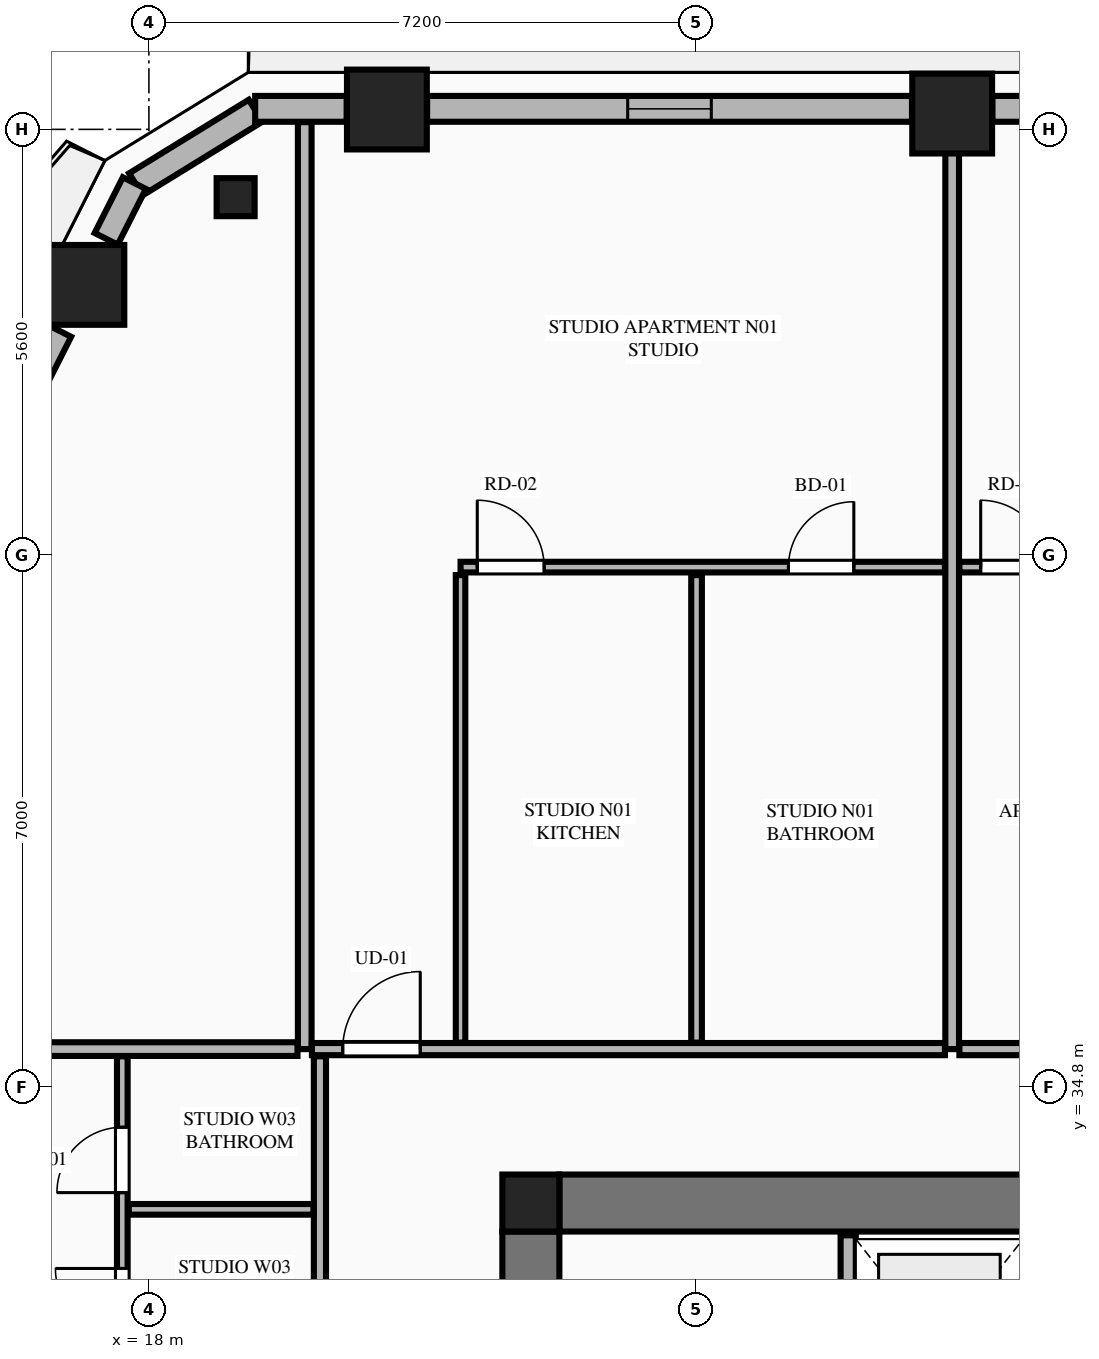
"""IFC4 building model, lengths in metres.
Left out: names, types, materials, properties, quantities, classifications, styles, units other than length and angle.
Written with IfcOpenShell. Run it as: python <this file> out.ifc"""

import sys

from ifc_helpers import new_model, si_unit, direction, frame, frame_2d, origin, origin_2d, place, context, subcontext, project, spatial, rectangle, extrude, element, fill, save


model = new_model("IFC4")
c1 = context("Model", 3, precision=1e-05, world=origin(), true_north=direction((0.0, 1.0)))
c2 = subcontext(c1, "Body", "Model", "MODEL_VIEW")
j1 = project(units=[si_unit("LENGTHUNIT", "METRE"), si_unit("PLANEANGLEUNIT", "RADIAN")], contexts=[c1])
p1 = place(None, origin())
s1 = spatial("IfcSite", under=j1, at=p1, CompositionType="ELEMENT")
p2 = place(p1, origin())
s2 = spatial("IfcBuilding", under=s1, at=p2, CompositionType="ELEMENT")
p3 = place(p2, frame((0.0, 0.0, 137.45)))
s3 = spatial("IfcBuildingStorey", under=s2, at=p3, CompositionType="ELEMENT", Elevation=137.45)
p4 = place(p3, frame((23.025, 33.275, 0.0), z_axis=(0.0, 0.0, 1.0), x_axis=(1.0, 0.0, 0.0)))
e1 = element("IfcColumn", 1, at=p4, inside=s3, PredefinedType="COLUMN", context=c2, shape_type="SweptSolid", body=[
    extrude(rectangle(XDim=0.75, YDim=0.75, at=origin_2d()), origin(), (0.0, 0.0, 1.0), 3.55),
])
p5 = place(p3, frame((23.4, 33.275, 0.0), z_axis=(0.0, 0.0, 1.0), x_axis=(1.0, 0.0, 0.0)))
e2 = element("IfcWall", 2, at=p5, inside=s3, PredefinedType="SHEAR", context=c2, shape_type="SweptSolid", body=[
    extrude(rectangle(XDim=18.0, YDim=0.75, at=frame_2d((9.0, 0.0))), origin(), (0.0, 0.0, 1.0), 3.34),
])
p6 = place(p3, frame((23.025, 18.9, 0.0), z_axis=(0.0, 0.0, 1.0), x_axis=(0.0, 1.0, 0.0)))
e3 = element("IfcWall", 3, at=p6, inside=s3, PredefinedType="SHEAR", context=c2, shape_type="SweptSolid", body=[
    extrude(rectangle(XDim=14.0, YDim=0.75, at=frame_2d((7.0, 0.0))), origin(), (0.0, 0.0, 1.0), 3.34),
])
p7 = place(p6, frame((2.94, 0.0, 0.0)))
e4 = element("IfcOpeningElement", 4, at=p7, cuts=e3, PredefinedType="OPENING", context=c2, shape_type="SweptSolid", body=[
    extrude(rectangle(XDim=1.22, YDim=2.25, at=frame_2d((0.61, 1.125))), frame((0.0, 0.385, 0.0), z_axis=(0.0, -1.0, 0.0), x_axis=(1.0, 0.0, 0.0)), (0.0, 0.0, 1.0), 0.77),
])
for number, where, z_axis, x_axis in (
    (5, (28.568, 47.608, 0.0), (0.0, 0.0, 1.0), (1.0, 0.0, 0.0)),
    (6, (21.131, 47.661, 0.0), (0.0, 0.0, 1.0), (1.0, 0.0, 0.0)),
    (7, (17.151, 45.354, 0.0), (0.0, 0.0, 1.0), (1.0, 0.0, 0.0)),
):
    element("IfcColumn", number, at=place(p3, frame(where, z_axis=z_axis, x_axis=x_axis)), inside=s3, PredefinedType="COLUMN", context=c2, shape_type="SweptSolid", body=[
        extrude(rectangle(XDim=1.05, YDim=1.05, at=origin_2d()), origin(), (0.0, 0.0, 1.0), 3.55),
    ])
p8 = place(p3, frame((19.141, 46.508, 0.0), z_axis=(0.0, 0.0, 1.0), x_axis=(-0.865160173452, -0.501495637342, 0.0)))
e8 = element("IfcColumn", 8, at=p8, inside=s3, PredefinedType="PILASTER", context=c2, shape_type="SweptSolid", body=[
    extrude(rectangle(XDim=0.5, YDim=0.35, at=origin_2d()), origin(), (0.0, 0.0, 1.0), 3.55),
])
p9 = place(p3, frame((27.2, 30.0, 0.0), z_axis=(0.0, 0.0, 1.0), x_axis=(0.0, 1.0, 0.0)))
e9 = element("IfcWall", 9, at=p9, inside=s3, PredefinedType="PLUMBINGWALL", context=c2, shape_type="SweptSolid", body=[
    extrude(rectangle(XDim=2.85, YDim=0.2, at=frame_2d((1.425, 0.0))), origin(), (0.0, 0.0, 1.0), 3.34),
])
p10 = place(p3, frame((19.403, 47.645, 0.0), z_axis=(0.0, 0.0, 1.0), x_axis=(-0.851798915137, -0.523868884523, 0.0)))
e10 = element("IfcWall", 10, at=p10, inside=s3, PredefinedType="STANDARD", context=c2, shape_type="SweptSolid", body=[
    extrude(rectangle(XDim=1.848, YDim=0.34, at=frame_2d((0.924, 0.0))), origin(), (0.0, 0.0, 1.0), 3.34),
])
p11 = place(p3, frame((35.703, 47.67, 0.0), z_axis=(0.0, 0.0, 1.0), x_axis=(-1.0, 0.0, 0.0)))
e11 = element("IfcWall", 11, at=p11, inside=s3, PredefinedType="STANDARD", context=c2, shape_type="SweptSolid", body=[
    extrude(rectangle(XDim=6.606, YDim=0.34, at=frame_2d((3.303, 0.0))), origin(), (0.0, 0.0, 1.0), 2.797),
])
p12 = place(p11, frame((3.254, 0.0, 0.0)))
e12 = element("IfcOpeningElement", 12, at=p12, cuts=e11, PredefinedType="OPENING", context=c2, shape_type="SweptSolid", body=[
    extrude(rectangle(XDim=1.1, YDim=2.25, at=frame_2d((0.55, 1.125))), frame((0.0, 0.18, 0.0), z_axis=(0.0, -1.0, 0.0), x_axis=(1.0, 0.0, 0.0)), (0.0, 0.0, 1.0), 0.36),
])
p13 = place(p3, frame((28.039, 47.67, 0.0), z_axis=(0.0, 0.0, 1.0), x_axis=(-1.0, 0.0, 0.0)))
e13 = element("IfcWall", 13, at=p13, inside=s3, PredefinedType="STANDARD", context=c2, shape_type="SweptSolid", body=[
    extrude(rectangle(XDim=6.379, YDim=0.34, at=frame_2d((3.189, 0.0))), origin(), (0.0, 0.0, 1.0), 2.797),
])
p14 = place(p13, frame((2.64, 0.0, 0.75)))
e14 = element("IfcOpeningElement", 14, at=p14, cuts=e13, PredefinedType="OPENING", context=c2, shape_type="SweptSolid", body=[
    extrude(rectangle(XDim=1.1, YDim=1.897, at=frame_2d((0.55, 0.948))), frame((0.0, 0.18, 0.0), z_axis=(0.0, -1.0, 0.0), x_axis=(1.0, 0.0, 0.0)), (0.0, 0.0, 1.0), 0.36),
])
p15 = place(p3, frame((20.602, 47.67, 0.0), z_axis=(0.0, 0.0, 1.0), x_axis=(-1.0, 0.0, 0.0)))
e15 = element("IfcWall", 15, at=p15, inside=s3, PredefinedType="STANDARD", context=c2, shape_type="SweptSolid", body=[
    extrude(rectangle(XDim=1.204, YDim=0.34, at=frame_2d((0.602, 0.0))), origin(), (0.0, 0.0, 1.0), 3.34),
])
p16 = place(p3, frame((17.809, 46.693, 0.0), z_axis=(0.0, 0.0, 1.0), x_axis=(-0.45160540153, -0.89221777684, 0.0)))
e16 = element("IfcWall", 16, at=p16, inside=s3, PredefinedType="STANDARD", context=c2, shape_type="SweptSolid", body=[
    extrude(rectangle(XDim=0.822, YDim=0.34, at=frame_2d((0.411, 0.0))), origin(), (0.0, 0.0, 1.0), 3.34),
])
p17 = place(p3, frame((16.825, 44.748, 0.0), z_axis=(0.0, 0.0, 1.0), x_axis=(-0.451548465867, -0.892246593142, 0.0)))
e17 = element("IfcWall", 17, at=p17, inside=s3, PredefinedType="STANDARD", context=c2, shape_type="SweptSolid", body=[
    extrude(rectangle(XDim=5.04, YDim=0.34, at=frame_2d((2.52, 0.0))), origin(), (0.0, 0.0, 1.0), 2.797),
])
p18 = place(p17, frame((1.97, 0.0, 0.75)))
e18 = element("IfcOpeningElement", 18, at=p18, cuts=e17, PredefinedType="OPENING", context=c2, shape_type="SweptSolid", body=[
    extrude(rectangle(XDim=1.1, YDim=1.897, at=frame_2d((0.55, 0.948))), frame((0.0, 0.18, 0.0), z_axis=(0.0, -1.0, 0.0), x_axis=(1.0, 0.0, 0.0)), (0.0, 0.0, 1.0), 0.36),
])
p19 = place(p3, frame((20.05, 35.3, 0.0), z_axis=(0.0, 0.0, 1.0), x_axis=(0.0, 1.0, 0.0)))
e19 = element("IfcWall", 19, at=p19, inside=s3, PredefinedType="PARTITIONING", context=c2, shape_type="SweptSolid", body=[
    extrude(rectangle(XDim=12.195, YDim=0.18, at=frame_2d((6.098, 0.0))), origin(), (0.0, 0.0, 1.0), 3.34),
])
p20 = place(p3, frame((28.568, 35.3, 0.0), z_axis=(0.0, 0.0, 1.0), x_axis=(0.0, 1.0, 0.0)))
e20 = element("IfcWall", 20, at=p20, inside=s3, PredefinedType="PARTITIONING", context=c2, shape_type="SweptSolid", body=[
    extrude(rectangle(XDim=12.195, YDim=0.18, at=frame_2d((6.098, 0.0))), origin(), (0.0, 0.0, 1.0), 2.722),
])
p21 = place(p3, frame((20.145, 35.3, 0.0), z_axis=(0.0, 0.0, 1.0), x_axis=(1.0, 0.0, 0.0)))
e21 = element("IfcWall", 21, at=p21, inside=s3, PredefinedType="PARTITIONING", context=c2, shape_type="SweptSolid", body=[
    extrude(rectangle(XDim=8.328, YDim=0.16, at=frame_2d((4.164, 0.0))), origin(), (0.0, 0.0, 1.0), 3.34),
])
p22 = place(p21, frame((0.405, 0.0, 0.0)))
e22 = element("IfcOpeningElement", 22, at=p22, cuts=e21, PredefinedType="OPENING", context=c2, shape_type="SweptSolid", body=[
    extrude(rectangle(XDim=1.02, YDim=2.25, at=frame_2d((0.51, 1.125))), frame((0.0, 0.09, 0.0), z_axis=(0.0, -1.0, 0.0), x_axis=(1.0, 0.0, 0.0)), (0.0, 0.0, 1.0), 0.18),
])
p23 = place(p3, frame((22.1, 35.385, 0.0), z_axis=(0.0, 0.0, 1.0), x_axis=(0.0, 1.0, 0.0)))
e23 = element("IfcWall", 23, at=p23, inside=s3, PredefinedType="PARTITIONING", context=c2, shape_type="SweptSolid", body=[
    extrude(rectangle(XDim=6.151, YDim=0.125, at=frame_2d((3.075, 0.0))), origin(), (0.0, 0.0, 1.0), 2.722),
])
p24 = place(p3, frame((22.1, 41.641, 0.0), z_axis=(0.0, 0.0, 1.0), x_axis=(1.0, 0.0, 0.0)))
e24 = element("IfcWall", 24, at=p24, inside=s3, PredefinedType="PLUMBINGWALL", context=c2, shape_type="SweptSolid", body=[
    extrude(rectangle(XDim=6.373, YDim=0.14, at=frame_2d((3.187, 0.0))), origin(), (0.0, 0.0, 1.0), 3.34),
])
p25 = place(p24, frame((4.314, 0.0, 0.0)))
e25 = element("IfcOpeningElement", 25, at=p25, cuts=e24, PredefinedType="OPENING", context=c2, shape_type="SweptSolid", body=[
    extrude(rectangle(XDim=0.86, YDim=2.1, at=frame_2d((0.43, 1.05))), frame((0.0, 0.08, 0.0), z_axis=(0.0, -1.0, 0.0), x_axis=(1.0, 0.0, 0.0)), (0.0, 0.0, 1.0), 0.16),
])
p26 = place(p24, frame((0.22, 0.0, 0.0)))
e26 = element("IfcOpeningElement", 26, at=p26, cuts=e24, PredefinedType="OPENING", context=c2, shape_type="SweptSolid", body=[
    extrude(rectangle(XDim=0.88, YDim=2.15, at=frame_2d((0.44, 1.075))), frame((0.0, 0.08, 0.0), z_axis=(0.0, -1.0, 0.0), x_axis=(1.0, 0.0, 0.0)), (0.0, 0.0, 1.0), 0.16),
])
p27 = place(p3, frame((25.205, 35.385, 0.0), z_axis=(0.0, 0.0, 1.0), x_axis=(0.0, 1.0, 0.0)))
e27 = element("IfcWall", 27, at=p27, inside=s3, PredefinedType="PLUMBINGWALL", context=c2, shape_type="SweptSolid", body=[
    extrude(rectangle(XDim=6.151, YDim=0.14, at=frame_2d((3.075, 0.0))), origin(), (0.0, 0.0, 1.0), 3.34),
])
p28 = place(p3, frame((28.663, 35.3, 0.0), z_axis=(0.0, 0.0, 1.0), x_axis=(1.0, 0.0, 0.0)))
e28 = element("IfcWall", 28, at=p28, inside=s3, PredefinedType="PARTITIONING", context=c2, shape_type="SweptSolid", body=[
    extrude(rectangle(XDim=15.992, YDim=0.16, at=frame_2d((7.996, 0.0))), origin(), (0.0, 0.0, 1.0), 3.34),
])
p29 = place(p28, frame((14.087, 0.0, 0.0)))
e29 = element("IfcOpeningElement", 29, at=p29, cuts=e28, PredefinedType="OPENING", context=c2, shape_type="SweptSolid", body=[
    extrude(rectangle(XDim=1.02, YDim=2.25, at=frame_2d((0.51, 1.125))), frame((0.0, 0.09, 0.0), z_axis=(0.0, -1.0, 0.0), x_axis=(1.0, 0.0, 0.0)), (0.0, 0.0, 1.0), 0.18),
])
p30 = place(p3, frame((28.663, 41.641, 0.0), z_axis=(0.0, 0.0, 1.0), x_axis=(1.0, 0.0, 0.0)))
e30 = element("IfcWall", 30, at=p30, inside=s3, PredefinedType="PLUMBINGWALL", context=c2, shape_type="SweptSolid", body=[
    extrude(rectangle(XDim=6.065, YDim=0.14, at=frame_2d((3.032, 0.0))), origin(), (0.0, 0.0, 1.0), 3.34),
])
p31 = place(p30, frame((0.28, 0.0, 0.0)))
e31 = element("IfcOpeningElement", 31, at=p31, cuts=e30, PredefinedType="OPENING", context=c2, shape_type="SweptSolid", body=[
    extrude(rectangle(XDim=0.88, YDim=2.15, at=frame_2d((0.44, 1.075))), frame((0.0, 0.08, 0.0), z_axis=(0.0, -1.0, 0.0), x_axis=(1.0, 0.0, 0.0)), (0.0, 0.0, 1.0), 0.16),
])
p32 = place(p30, frame((4.484, 0.0, 0.0)))
e32 = element("IfcOpeningElement", 32, at=p32, cuts=e30, PredefinedType="OPENING", context=c2, shape_type="SweptSolid", body=[
    extrude(rectangle(XDim=0.86, YDim=2.1, at=frame_2d((0.43, 1.05))), frame((0.0, 0.08, 0.0), z_axis=(0.0, -1.0, 0.0), x_axis=(1.0, 0.0, 0.0)), (0.0, 0.0, 1.0), 0.16),
])
p33 = place(p3, frame((12.286, 35.3, 0.0), z_axis=(0.0, 0.0, 1.0), x_axis=(1.0, 0.0, 0.0)))
e33 = element("IfcWall", 33, at=p33, inside=s3, PredefinedType="PARTITIONING", context=c2, shape_type="SweptSolid", body=[
    extrude(rectangle(XDim=7.669, YDim=0.18, at=frame_2d((3.834, 0.0))), origin(), (0.0, 0.0, 1.0), 3.34),
])
p34 = place(p3, frame((20.25, 29.379, 0.0), z_axis=(0.0, 0.0, 1.0), x_axis=(0.0, 1.0, 0.0)))
e34 = element("IfcWall", 34, at=p34, inside=s3, PredefinedType="PARTITIONING", context=c2, shape_type="SweptSolid", body=[
    extrude(rectangle(XDim=5.826, YDim=0.16, at=frame_2d((2.913, 0.0))), origin(), (0.0, 0.0, 1.0), 3.34),
])
p35 = place(p34, frame((0.4, 0.0, 0.0)))
e35 = element("IfcOpeningElement", 35, at=p35, cuts=e34, PredefinedType="OPENING", context=c2, shape_type="SweptSolid", body=[
    extrude(rectangle(XDim=1.02, YDim=2.25, at=frame_2d((0.51, 1.125))), frame((0.0, 0.09, 0.0), z_axis=(0.0, -1.0, 0.0), x_axis=(1.0, 0.0, 0.0)), (0.0, 0.0, 1.0), 0.18),
])
p36 = place(p3, frame((17.65, 31.334, 0.0), z_axis=(0.0, 0.0, 1.0), x_axis=(0.0, 1.0, 0.0)))
e36 = element("IfcWall", 36, at=p36, inside=s3, PredefinedType="PLUMBINGWALL", context=c2, shape_type="SweptSolid", body=[
    extrude(rectangle(XDim=3.871, YDim=0.14, at=frame_2d((1.936, 0.0))), origin(), (0.0, 0.0, 1.0), 3.34),
])
p37 = place(p36, frame((2.078, 0.0, 0.0)))
e37 = element("IfcOpeningElement", 37, at=p37, cuts=e36, PredefinedType="OPENING", context=c2, shape_type="SweptSolid", body=[
    extrude(rectangle(XDim=0.86, YDim=2.1, at=frame_2d((0.43, 1.05))), frame((0.0, 0.08, 0.0), z_axis=(0.0, -1.0, 0.0), x_axis=(1.0, 0.0, 0.0)), (0.0, 0.0, 1.0), 0.16),
])
p38 = place(p36, frame((0.2, 0.0, 0.0)))
e38 = element("IfcOpeningElement", 38, at=p38, cuts=e36, PredefinedType="OPENING", context=c2, shape_type="SweptSolid", body=[
    extrude(rectangle(XDim=0.88, YDim=2.15, at=frame_2d((0.44, 1.075))), frame((0.0, 0.08, 0.0), z_axis=(0.0, -1.0, 0.0), x_axis=(1.0, 0.0, 0.0)), (0.0, 0.0, 1.0), 0.16),
])
p39 = place(p3, frame((17.735, 33.192, 0.0), z_axis=(0.0, 0.0, 1.0), x_axis=(1.0, 0.0, 0.0)))
e39 = element("IfcWall", 39, at=p39, inside=s3, PredefinedType="PLUMBINGWALL", context=c2, shape_type="SweptSolid", body=[
    extrude(rectangle(XDim=2.43, YDim=0.14, at=frame_2d((1.215, 0.0))), origin(), (0.0, 0.0, 1.0), 2.722),
])
p40 = place(p14, origin())
e40 = element("IfcWindow", 40, at=p40, inside=s3, PartitioningType="SINGLE_PANEL", PredefinedType="WINDOW", context=c2, shape_type="SweptSolid", body=[
    extrude(rectangle(XDim=1.1, YDim=1.897, at=frame_2d((0.55, 0.948))), frame((0.0, 0.03, 0.0), z_axis=(0.0, -1.0, 0.0), x_axis=(1.0, 0.0, 0.0)), (0.0, 0.0, 1.0), 0.06),
])
fill(e14, e40)
p41 = place(p25, origin())
e41 = element("IfcDoor", 41, at=p41, inside=s3, OperationType="SINGLE_SWING_RIGHT", PredefinedType="DOOR", context=c2, shape_type="SweptSolid", body=[
    extrude(rectangle(XDim=0.86, YDim=2.1, at=frame_2d((0.43, 1.05))), frame((0.0, 0.025, 0.0), z_axis=(0.0, -1.0, 0.0), x_axis=(1.0, 0.0, 0.0)), (0.0, 0.0, 1.0), 0.05),
])
fill(e25, e41)
p42 = place(p22, origin())
e42 = element("IfcDoor", 42, at=p42, inside=s3, OperationType="SINGLE_SWING_RIGHT", PredefinedType="DOOR", context=c2, shape_type="SweptSolid", body=[
    extrude(rectangle(XDim=1.02, YDim=2.25, at=frame_2d((0.51, 1.125))), frame((0.0, 0.025, 0.0), z_axis=(0.0, -1.0, 0.0), x_axis=(1.0, 0.0, 0.0)), (0.0, 0.0, 1.0), 0.05),
])
fill(e22, e42)
p43 = place(p26, origin())
e43 = element("IfcDoor", 43, at=p43, inside=s3, OperationType="SINGLE_SWING_LEFT", PredefinedType="DOOR", context=c2, shape_type="SweptSolid", body=[
    extrude(rectangle(XDim=0.88, YDim=2.15, at=frame_2d((0.44, 1.075))), frame((0.0, 0.025, 0.0), z_axis=(0.0, -1.0, 0.0), x_axis=(1.0, 0.0, 0.0)), (0.0, 0.0, 1.0), 0.05),
])
fill(e26, e43)
p44 = place(p31, origin())
e44 = element("IfcDoor", 44, at=p44, inside=s3, OperationType="SINGLE_SWING_LEFT", PredefinedType="DOOR", context=c2, shape_type="SweptSolid", body=[
    extrude(rectangle(XDim=0.88, YDim=2.15, at=frame_2d((0.44, 1.075))), frame((0.0, 0.025, 0.0), z_axis=(0.0, -1.0, 0.0), x_axis=(1.0, 0.0, 0.0)), (0.0, 0.0, 1.0), 0.05),
])
fill(e31, e44)
p45 = place(p37, origin())
e45 = element("IfcDoor", 45, at=p45, inside=s3, OperationType="SINGLE_SWING_LEFT", PredefinedType="DOOR", context=c2, shape_type="SweptSolid", body=[
    extrude(rectangle(XDim=0.86, YDim=2.1, at=frame_2d((0.43, 1.05))), frame((0.0, 0.025, 0.0), z_axis=(0.0, -1.0, 0.0), x_axis=(1.0, 0.0, 0.0)), (0.0, 0.0, 1.0), 0.05),
])
fill(e37, e45)
p46 = place(p38, origin())
e46 = element("IfcDoor", 46, at=p46, inside=s3, OperationType="SINGLE_SWING_RIGHT", PredefinedType="DOOR", context=c2, shape_type="SweptSolid", body=[
    extrude(rectangle(XDim=0.88, YDim=2.15, at=frame_2d((0.44, 1.075))), frame((0.0, 0.025, 0.0), z_axis=(0.0, -1.0, 0.0), x_axis=(1.0, 0.0, 0.0)), (0.0, 0.0, 1.0), 0.05),
])
fill(e38, e46)
save(model, sys.argv[1])
